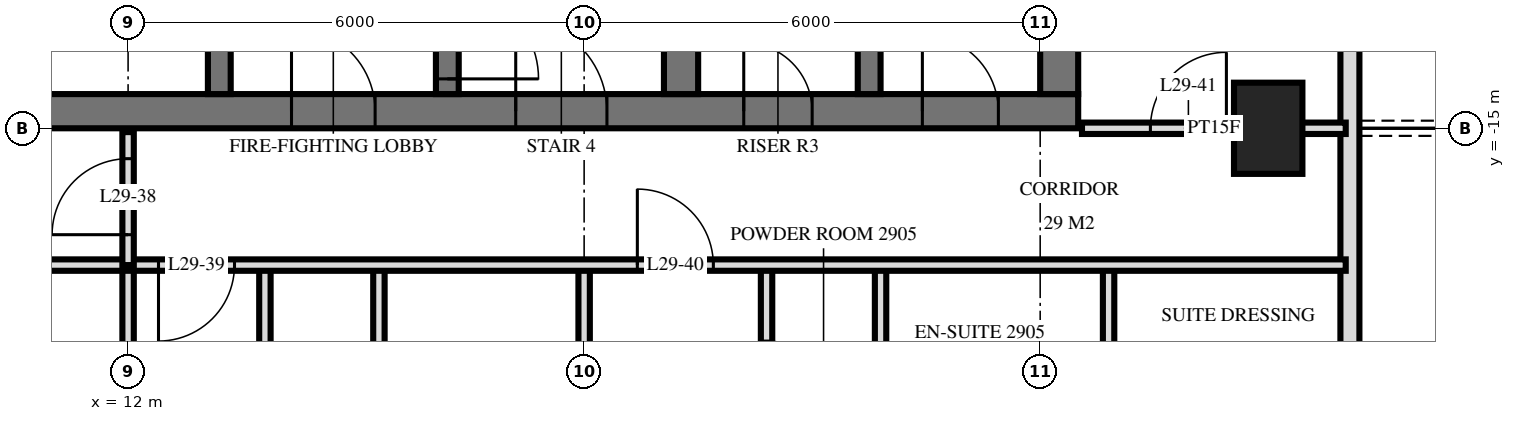
"""IFC4 building model, lengths in metres.
Left out: names, types, materials, properties, quantities, classifications, styles, units other than length and angle.
Written with IfcOpenShell. Run it as: python <this file> out.ifc"""

import sys

from ifc_helpers import new_model, si_unit, direction, frame, frame_2d, origin, origin_2d, place, context, subcontext, project, spatial, rectangle, extrude, element, fill, save


model = new_model("IFC4")
c1 = context("Model", 3, precision=1e-05, world=origin(), true_north=direction((0.0, 1.0)))
c2 = subcontext(c1, "Body", "Model", "MODEL_VIEW")
j1 = project(units=[si_unit("LENGTHUNIT", "METRE"), si_unit("PLANEANGLEUNIT", "RADIAN")], contexts=[c1])
p1 = place(None, origin())
s1 = spatial("IfcSite", under=j1, at=p1, CompositionType="ELEMENT")
p2 = place(p1, origin())
s2 = spatial("IfcBuilding", under=s1, at=p2, CompositionType="ELEMENT")
p3 = place(p2, frame((0.0, 0.0, 116.4)))
s3 = spatial("IfcBuildingStorey", under=s2, at=p3, CompositionType="ELEMENT", Elevation=116.4)
p4 = place(p3, frame((27.0, -15.0, 0.0), z_axis=(0.0, 0.0, 1.0), x_axis=(0.0, 1.0, 0.0)))
e1 = element("IfcColumn", 1, at=p4, inside=s3, PredefinedType="COLUMN", context=c2, shape_type="SweptSolid", body=[
    extrude(rectangle(XDim=1.2, YDim=0.9, at=origin_2d()), origin(), (0.0, 0.0, 1.0), 3.6),
])
p5 = place(p3, frame((10.0, -14.775, 0.0), z_axis=(0.0, 0.0, 1.0), x_axis=(1.0, 0.0, 0.0)))
e2 = element("IfcWall", 2, at=p5, inside=s3, PredefinedType="SHEAR", context=c2, shape_type="SweptSolid", body=[
    extrude(rectangle(XDim=14.5, YDim=0.45, at=frame_2d((7.25, 0.0))), origin(), (0.0, 0.0, 1.0), 3.6),
])
p6 = place(p5, frame((7.1, 0.0, 0.0)))
e3 = element("IfcOpeningElement", 3, at=p6, cuts=e2, PredefinedType="OPENING", context=c2, shape_type="SweptSolid", body=[
    extrude(rectangle(XDim=1.2, YDim=2.1, at=frame_2d((0.6, 1.05))), frame((0.0, 0.235, 0.0), z_axis=(0.0, -1.0, 0.0), x_axis=(1.0, 0.0, 0.0)), (0.0, 0.0, 1.0), 0.47),
])
p7 = place(p5, frame((4.15, 0.0, 0.0)))
e4 = element("IfcOpeningElement", 4, at=p7, cuts=e2, PredefinedType="OPENING", context=c2, shape_type="SweptSolid", body=[
    extrude(rectangle(XDim=1.1, YDim=2.1, at=frame_2d((0.55, 1.05))), frame((0.0, 0.235, 0.0), z_axis=(0.0, -1.0, 0.0), x_axis=(1.0, 0.0, 0.0)), (0.0, 0.0, 1.0), 0.47),
])
p8 = place(p5, frame((10.1, 0.0, 0.0)))
e5 = element("IfcOpeningElement", 5, at=p8, cuts=e2, PredefinedType="OPENING", context=c2, shape_type="SweptSolid", body=[
    extrude(rectangle(XDim=0.9, YDim=2.1, at=frame_2d((0.45, 1.05))), frame((0.0, 0.235, 0.0), z_axis=(0.0, -1.0, 0.0), x_axis=(1.0, 0.0, 0.0)), (0.0, 0.0, 1.0), 0.47),
])
p9 = place(p5, frame((12.45, 0.0, 0.0)))
e6 = element("IfcOpeningElement", 6, at=p9, cuts=e2, PredefinedType="OPENING", context=c2, shape_type="SweptSolid", body=[
    extrude(rectangle(XDim=1.0, YDim=2.1, at=frame_2d((0.5, 1.05))), frame((0.0, 0.235, 0.0), z_axis=(0.0, -1.0, 0.0), x_axis=(1.0, 0.0, 0.0)), (0.0, 0.0, 1.0), 0.47),
])
p10 = place(p3, frame((24.25, -14.55, 0.0), z_axis=(0.0, 0.0, 1.0), x_axis=(0.0, 1.0, 0.0)))
e7 = element("IfcWall", 7, at=p10, inside=s3, PredefinedType="SHEAR", context=c2, shape_type="SweptSolid", body=[
    extrude(rectangle(XDim=14.1, YDim=0.5, at=frame_2d((7.05, 0.0))), origin(), (0.0, 0.0, 1.0), 3.6),
])
p11 = place(p3, frame((13.2, -14.55, 0.0), z_axis=(0.0, 0.0, 1.0), x_axis=(0.0, 1.0, 0.0)))
e8 = element("IfcWall", 8, at=p11, inside=s3, PredefinedType="SHEAR", context=c2, shape_type="SweptSolid", body=[
    extrude(rectangle(XDim=5.4, YDim=0.3, at=frame_2d((2.7, 0.0))), origin(), (0.0, 0.0, 1.0), 3.6),
])
p12 = place(p11, frame((4.0, 0.0, 0.0)))
e9 = element("IfcOpeningElement", 9, at=p12, cuts=e8, PredefinedType="OPENING", context=c2, shape_type="SweptSolid", body=[
    extrude(rectangle(XDim=1.2, YDim=2.1, at=frame_2d((0.6, 1.05))), frame((0.0, 0.16, 0.0), z_axis=(0.0, -1.0, 0.0), x_axis=(1.0, 0.0, 0.0)), (0.0, 0.0, 1.0), 0.32),
])
p13 = place(p3, frame((16.2, -14.55, 0.0), z_axis=(0.0, 0.0, 1.0), x_axis=(0.0, 1.0, 0.0)))
e10 = element("IfcWall", 10, at=p13, inside=s3, PredefinedType="SHEAR", context=c2, shape_type="SweptSolid", body=[
    extrude(rectangle(XDim=5.4, YDim=0.3, at=frame_2d((2.7, 0.0))), origin(), (0.0, 0.0, 1.0), 3.6),
])
p14 = place(p13, frame((0.2, 0.0, 0.0)))
e11 = element("IfcOpeningElement", 11, at=p14, cuts=e10, PredefinedType="OPENING", context=c2, shape_type="SweptSolid", body=[
    extrude(rectangle(XDim=1.2, YDim=2.1, at=frame_2d((0.6, 1.05))), frame((0.0, 0.16, 0.0), z_axis=(0.0, -1.0, 0.0), x_axis=(1.0, 0.0, 0.0)), (0.0, 0.0, 1.0), 0.32),
])
p15 = place(p3, frame((19.275, -14.55, 0.0), z_axis=(0.0, 0.0, 1.0), x_axis=(0.0, 1.0, 0.0)))
e12 = element("IfcWall", 12, at=p15, inside=s3, PredefinedType="SHEAR", context=c2, shape_type="SweptSolid", body=[
    extrude(rectangle(XDim=5.4, YDim=0.45, at=frame_2d((2.7, 0.0))), origin(), (0.0, 0.0, 1.0), 3.6),
])
p16 = place(p3, frame((21.75, -14.55, 0.0), z_axis=(0.0, 0.0, 1.0), x_axis=(0.0, 1.0, 0.0)))
e13 = element("IfcWall", 13, at=p16, inside=s3, PredefinedType="SHEAR", context=c2, shape_type="SweptSolid", body=[
    extrude(rectangle(XDim=5.4, YDim=0.3, at=frame_2d((2.7, 0.0))), origin(), (0.0, 0.0, 1.0), 3.6),
])
p17 = place(p3, frame((28.075, -29.275, 0.0), z_axis=(0.0, 0.0, 1.0), x_axis=(0.0, 1.0, 0.0)))
e14 = element("IfcWall", 14, at=p17, inside=s3, PredefinedType="SOLIDWALL", context=c2, shape_type="SweptSolid", body=[
    extrude(rectangle(XDim=25.951, YDim=0.25, at=frame_2d((12.975, 0.0))), origin(), (0.0, 0.0, 1.0), 3.32),
])
p18 = place(p17, frame((0.575, 0.0, 0.0)))
e15 = element("IfcOpeningElement", 15, at=p18, cuts=e14, PredefinedType="OPENING", context=c2, shape_type="SweptSolid", body=[
    extrude(rectangle(XDim=1.8, YDim=2.4, at=frame_2d((0.9, 1.2))), frame((0.0, 0.135, 0.0), z_axis=(0.0, -1.0, 0.0), x_axis=(1.0, 0.0, 0.0)), (0.0, 0.0, 1.0), 0.27),
])
p19 = place(p17, frame((3.325, 0.0, 0.3)))
e16 = element("IfcOpeningElement", 16, at=p19, cuts=e14, PredefinedType="OPENING", context=c2, shape_type="SweptSolid", body=[
    extrude(rectangle(XDim=1.8, YDim=2.1, at=frame_2d((0.9, 1.05))), frame((0.0, 0.135, 0.0), z_axis=(0.0, -1.0, 0.0), x_axis=(1.0, 0.0, 0.0)), (0.0, 0.0, 1.0), 0.27),
])
p20 = place(p17, frame((6.075, 0.0, 0.0)))
e17 = element("IfcOpeningElement", 17, at=p20, cuts=e14, PredefinedType="OPENING", context=c2, shape_type="SweptSolid", body=[
    extrude(rectangle(XDim=1.8, YDim=2.4, at=frame_2d((0.9, 1.2))), frame((0.0, 0.135, 0.0), z_axis=(0.0, -1.0, 0.0), x_axis=(1.0, 0.0, 0.0)), (0.0, 0.0, 1.0), 0.27),
])
p21 = place(p17, frame((17.125, 0.0, 0.0)))
e18 = element("IfcOpeningElement", 18, at=p21, cuts=e14, PredefinedType="OPENING", context=c2, shape_type="SweptSolid", body=[
    extrude(rectangle(XDim=1.8, YDim=2.4, at=frame_2d((0.9, 1.2))), frame((0.0, 0.135, 0.0), z_axis=(0.0, -1.0, 0.0), x_axis=(1.0, 0.0, 0.0)), (0.0, 0.0, 1.0), 0.27),
])
p22 = place(p3, frame((24.9, -19.8, 0.0), z_axis=(0.0, 0.0, 1.0), x_axis=(0.0, 1.0, 0.0)))
e19 = element("IfcWall", 19, at=p22, inside=s3, PredefinedType="PARTITIONING", context=c2, shape_type="SweptSolid", body=[
    extrude(rectangle(XDim=3.0, YDim=0.15, at=frame_2d((1.5, 0.0))), origin(), (0.0, 0.0, 1.0), 3.32),
])
p23 = place(p3, frame((21.9, -19.8, 0.0), z_axis=(0.0, 0.0, 1.0), x_axis=(0.0, 1.0, 0.0)))
e20 = element("IfcWall", 20, at=p23, inside=s3, PredefinedType="PLUMBINGWALL", context=c2, shape_type="SweptSolid", body=[
    extrude(rectangle(XDim=3.0, YDim=0.15, at=frame_2d((1.5, 0.0))), origin(), (0.0, 0.0, 1.0), 3.32),
])
p24 = place(p3, frame((20.4, -19.8, 0.0), z_axis=(0.0, 0.0, 1.0), x_axis=(0.0, 1.0, 0.0)))
e21 = element("IfcWall", 21, at=p24, inside=s3, PredefinedType="PARTITIONING", context=c2, shape_type="SweptSolid", body=[
    extrude(rectangle(XDim=3.0, YDim=0.15, at=frame_2d((1.5, 0.0))), origin(), (0.0, 0.0, 1.0), 3.32),
])
p25 = place(p24, frame((1.0, 0.0, 0.0)))
e22 = element("IfcOpeningElement", 22, at=p25, cuts=e21, PredefinedType="OPENING", context=c2, shape_type="SweptSolid", body=[
    extrude(rectangle(XDim=1.0, YDim=2.1, at=frame_2d((0.5, 1.05))), frame((0.0, 0.085, 0.0), z_axis=(0.0, -1.0, 0.0), x_axis=(1.0, 0.0, 0.0)), (0.0, 0.0, 1.0), 0.17),
])
p26 = place(p3, frame((18.0, -19.8, 0.0), z_axis=(0.0, 0.0, 1.0), x_axis=(0.0, 1.0, 0.0)))
e23 = element("IfcWall", 23, at=p26, inside=s3, PredefinedType="PARTITIONING", context=c2, shape_type="SweptSolid", body=[
    extrude(rectangle(XDim=3.0, YDim=0.15, at=frame_2d((1.5, 0.0))), origin(), (0.0, 0.0, 1.0), 3.32),
])
p27 = place(p3, frame((15.3, -20.6, 0.0), z_axis=(0.0, 0.0, 1.0), x_axis=(0.0, 1.0, 0.0)))
e24 = element("IfcWall", 24, at=p27, inside=s3, PredefinedType="PARTITIONING", context=c2, shape_type="SweptSolid", body=[
    extrude(rectangle(XDim=3.8, YDim=0.15, at=frame_2d((1.9, 0.0))), origin(), (0.0, 0.0, 1.0), 3.32),
])
p28 = place(p3, frame((13.8, -20.6, 0.0), z_axis=(0.0, 0.0, 1.0), x_axis=(0.0, 1.0, 0.0)))
e25 = element("IfcWall", 25, at=p28, inside=s3, PredefinedType="PARTITIONING", context=c2, shape_type="SweptSolid", body=[
    extrude(rectangle(XDim=3.8, YDim=0.15, at=frame_2d((1.9, 0.0))), origin(), (0.0, 0.0, 1.0), 3.32),
])
p29 = place(p28, frame((1.45, 0.0, 0.0)))
e26 = element("IfcOpeningElement", 26, at=p29, cuts=e25, PredefinedType="OPENING", context=c2, shape_type="SweptSolid", body=[
    extrude(rectangle(XDim=0.9, YDim=2.1, at=frame_2d((0.45, 1.05))), frame((0.0, 0.085, 0.0), z_axis=(0.0, -1.0, 0.0), x_axis=(1.0, 0.0, 0.0)), (0.0, 0.0, 1.0), 0.17),
])
p30 = place(p3, frame((12.0, -16.8, 0.0), z_axis=(0.0, 0.0, 1.0), x_axis=(0.0, 1.0, 0.0)))
e27 = element("IfcWall", 27, at=p30, inside=s3, PredefinedType="PARTITIONING", context=c2, shape_type="SweptSolid", body=[
    extrude(rectangle(XDim=1.75, YDim=0.15, at=frame_2d((0.875, 0.0))), origin(), (0.0, 0.0, 1.0), 3.32),
])
p31 = place(p30, frame((0.4, 0.0, 0.0)))
e28 = element("IfcOpeningElement", 28, at=p31, cuts=e27, PredefinedType="OPENING", context=c2, shape_type="SweptSolid", body=[
    extrude(rectangle(XDim=1.0, YDim=2.1, at=frame_2d((0.5, 1.05))), frame((0.0, 0.085, 0.0), z_axis=(0.0, -1.0, 0.0), x_axis=(1.0, 0.0, 0.0)), (0.0, 0.0, 1.0), 0.17),
])
p32 = place(p3, frame((12.0, -33.62, 0.0), z_axis=(0.0, 0.0, 1.0), x_axis=(0.0, 1.0, 0.0)))
e29 = element("IfcWall", 29, at=p32, inside=s3, PredefinedType="PARTITIONING", context=c2, shape_type="SweptSolid", body=[
    extrude(rectangle(XDim=16.82, YDim=0.15, at=frame_2d((8.41, 0.0))), origin(), (0.0, 0.0, 1.0), 3.32),
])
p33 = place(p3, frame((-28.02, -16.8, 0.0), z_axis=(0.0, 0.0, 1.0), x_axis=(1.0, 0.0, 0.0)))
e30 = element("IfcWall", 30, at=p33, inside=s3, PredefinedType="PARTITIONING", context=c2, shape_type="SweptSolid", body=[
    extrude(rectangle(XDim=56.04, YDim=0.15, at=frame_2d((28.02, 0.0))), origin(), (0.0, 0.0, 1.0), 3.32),
])
p34 = place(p33, frame((13.17, 0.0, 0.0)))
e31 = element("IfcOpeningElement", 31, at=p34, cuts=e30, PredefinedType="OPENING", context=c2, shape_type="SweptSolid", body=[
    extrude(rectangle(XDim=1.0, YDim=2.1, at=frame_2d((0.5, 1.05))), frame((0.0, 0.085, 0.0), z_axis=(0.0, -1.0, 0.0), x_axis=(1.0, 0.0, 0.0)), (0.0, 0.0, 1.0), 0.17),
])
p35 = place(p33, frame((11.87, 0.0, 0.0)))
e32 = element("IfcOpeningElement", 32, at=p35, cuts=e30, PredefinedType="OPENING", context=c2, shape_type="SweptSolid", body=[
    extrude(rectangle(XDim=1.0, YDim=2.1, at=frame_2d((0.5, 1.05))), frame((0.0, 0.085, 0.0), z_axis=(0.0, -1.0, 0.0), x_axis=(1.0, 0.0, 0.0)), (0.0, 0.0, 1.0), 0.17),
])
p36 = place(p33, frame((8.32, 0.0, 0.0)))
e33 = element("IfcOpeningElement", 33, at=p36, cuts=e30, PredefinedType="OPENING", context=c2, shape_type="SweptSolid", body=[
    extrude(rectangle(XDim=1.0, YDim=2.1, at=frame_2d((0.5, 1.05))), frame((0.0, 0.085, 0.0), z_axis=(0.0, -1.0, 0.0), x_axis=(1.0, 0.0, 0.0)), (0.0, 0.0, 1.0), 0.17),
])
p37 = place(p33, frame((40.42, 0.0, 0.0)))
e34 = element("IfcOpeningElement", 34, at=p37, cuts=e30, PredefinedType="OPENING", context=c2, shape_type="SweptSolid", body=[
    extrude(rectangle(XDim=1.0, YDim=2.1, at=frame_2d((0.5, 1.05))), frame((0.0, 0.085, 0.0), z_axis=(0.0, -1.0, 0.0), x_axis=(1.0, 0.0, 0.0)), (0.0, 0.0, 1.0), 0.17),
])
p38 = place(p33, frame((46.72, 0.0, 0.0)))
e35 = element("IfcOpeningElement", 35, at=p38, cuts=e30, PredefinedType="OPENING", context=c2, shape_type="SweptSolid", body=[
    extrude(rectangle(XDim=1.0, YDim=2.1, at=frame_2d((0.5, 1.05))), frame((0.0, 0.085, 0.0), z_axis=(0.0, -1.0, 0.0), x_axis=(1.0, 0.0, 0.0)), (0.0, 0.0, 1.0), 0.17),
])
p39 = place(p33, frame((21.52, 0.0, 0.0)))
e36 = element("IfcOpeningElement", 36, at=p39, cuts=e30, PredefinedType="OPENING", context=c2, shape_type="SweptSolid", body=[
    extrude(rectangle(XDim=1.0, YDim=2.1, at=frame_2d((0.5, 1.05))), frame((0.0, 0.085, 0.0), z_axis=(0.0, -1.0, 0.0), x_axis=(1.0, 0.0, 0.0)), (0.0, 0.0, 1.0), 0.17),
])
p40 = place(p33, frame((30.52, 0.0, 0.0)))
e37 = element("IfcOpeningElement", 37, at=p40, cuts=e30, PredefinedType="OPENING", context=c2, shape_type="SweptSolid", body=[
    extrude(rectangle(XDim=1.0, YDim=2.1, at=frame_2d((0.5, 1.05))), frame((0.0, 0.085, 0.0), z_axis=(0.0, -1.0, 0.0), x_axis=(1.0, 0.0, 0.0)), (0.0, 0.0, 1.0), 0.17),
])
p41 = place(p33, frame((36.52, 0.0, 0.0)))
e38 = element("IfcOpeningElement", 38, at=p41, cuts=e30, PredefinedType="OPENING", context=c2, shape_type="SweptSolid", body=[
    extrude(rectangle(XDim=1.0, YDim=2.1, at=frame_2d((0.5, 1.05))), frame((0.0, 0.085, 0.0), z_axis=(0.0, -1.0, 0.0), x_axis=(1.0, 0.0, 0.0)), (0.0, 0.0, 1.0), 0.17),
])
p42 = place(p3, frame((24.55, -15.0, 0.0), z_axis=(0.0, 0.0, 1.0), x_axis=(1.0, 0.0, 0.0)))
e39 = element("IfcWall", 39, at=p42, inside=s3, PredefinedType="PARTITIONING", context=c2, shape_type="SweptSolid", body=[
    extrude(rectangle(XDim=3.47, YDim=0.15, at=frame_2d((1.735, 0.0))), origin(), (0.0, 0.0, 1.0), 3.32),
])
p43 = place(p42, frame((0.9, 0.0, 0.0)))
e40 = element("IfcOpeningElement", 40, at=p43, cuts=e39, PredefinedType="OPENING", context=c2, shape_type="SweptSolid", body=[
    extrude(rectangle(XDim=1.0, YDim=2.1, at=frame_2d((0.5, 1.05))), frame((0.0, 0.085, 0.0), z_axis=(0.0, -1.0, 0.0), x_axis=(1.0, 0.0, 0.0)), (0.0, 0.0, 1.0), 0.17),
])
p44 = place(p6, origin())
e41 = element("IfcDoor", 41, at=p44, inside=s3, OperationType="SINGLE_SWING_RIGHT", PredefinedType="DOOR", context=c2, shape_type="SweptSolid", body=[
    extrude(rectangle(XDim=1.2, YDim=2.1, at=frame_2d((0.6, 1.05))), frame((0.0, 0.025, 0.0), z_axis=(0.0, -1.0, 0.0), x_axis=(1.0, 0.0, 0.0)), (0.0, 0.0, 1.0), 0.05),
])
fill(e3, e41)
p45 = place(p7, origin())
e42 = element("IfcDoor", 42, at=p45, inside=s3, OperationType="SINGLE_SWING_RIGHT", PredefinedType="DOOR", context=c2, shape_type="SweptSolid", body=[
    extrude(rectangle(XDim=1.1, YDim=2.1, at=frame_2d((0.55, 1.05))), frame((0.0, 0.025, 0.0), z_axis=(0.0, -1.0, 0.0), x_axis=(1.0, 0.0, 0.0)), (0.0, 0.0, 1.0), 0.05),
])
fill(e4, e42)
p46 = place(p8, origin())
e43 = element("IfcDoor", 43, at=p46, inside=s3, OperationType="SINGLE_SWING_RIGHT", PredefinedType="DOOR", context=c2, shape_type="SweptSolid", body=[
    extrude(rectangle(XDim=0.9, YDim=2.1, at=frame_2d((0.45, 1.05))), frame((0.0, 0.025, 0.0), z_axis=(0.0, -1.0, 0.0), x_axis=(1.0, 0.0, 0.0)), (0.0, 0.0, 1.0), 0.05),
])
fill(e5, e43)
p47 = place(p9, origin())
e44 = element("IfcDoor", 44, at=p47, inside=s3, OperationType="SINGLE_SWING_RIGHT", PredefinedType="DOOR", context=c2, shape_type="SweptSolid", body=[
    extrude(rectangle(XDim=1.0, YDim=2.1, at=frame_2d((0.5, 1.05))), frame((0.0, 0.025, 0.0), z_axis=(0.0, -1.0, 0.0), x_axis=(1.0, 0.0, 0.0)), (0.0, 0.0, 1.0), 0.05),
])
fill(e6, e44)
p48 = place(p14, frame((0.6, 0.0, 0.0), z_axis=(0.0, 0.0, 1.0), x_axis=(-1.0, 0.0, 0.0)))
e45 = element("IfcDoor", 45, at=p48, inside=s3, OperationType="SINGLE_SWING_LEFT", PredefinedType="DOOR", context=c2, shape_type="SweptSolid", body=[
    extrude(rectangle(XDim=1.2, YDim=2.1, at=frame_2d((0.0, 1.05))), frame((0.0, -0.025, 0.0), z_axis=(0.0, 1.0, 0.0), x_axis=(-1.0, 0.0, 0.0)), (0.0, 0.0, 1.0), 0.05),
])
fill(e11, e45)
p49 = place(p31, origin())
e46 = element("IfcDoor", 46, at=p49, inside=s3, OperationType="SINGLE_SWING_RIGHT", PredefinedType="DOOR", context=c2, shape_type="SweptSolid", body=[
    extrude(rectangle(XDim=1.0, YDim=2.1, at=frame_2d((0.5, 1.05))), frame((0.0, 0.025, 0.0), z_axis=(0.0, -1.0, 0.0), x_axis=(1.0, 0.0, 0.0)), (0.0, 0.0, 1.0), 0.05),
])
fill(e28, e46)
p50 = place(p37, frame((0.5, 0.0, 0.0), z_axis=(0.0, 0.0, 1.0), x_axis=(-1.0, 0.0, 0.0)))
e47 = element("IfcDoor", 47, at=p50, inside=s3, OperationType="SINGLE_SWING_LEFT", PredefinedType="DOOR", context=c2, shape_type="SweptSolid", body=[
    extrude(rectangle(XDim=1.0, YDim=2.1, at=frame_2d((0.0, 1.05))), frame((0.0, -0.025, 0.0), z_axis=(0.0, 1.0, 0.0), x_axis=(-1.0, 0.0, 0.0)), (0.0, 0.0, 1.0), 0.05),
])
fill(e34, e47)
p51 = place(p38, origin())
e48 = element("IfcDoor", 48, at=p51, inside=s3, OperationType="SINGLE_SWING_RIGHT", PredefinedType="DOOR", context=c2, shape_type="SweptSolid", body=[
    extrude(rectangle(XDim=1.0, YDim=2.1, at=frame_2d((0.5, 1.05))), frame((0.0, 0.025, 0.0), z_axis=(0.0, -1.0, 0.0), x_axis=(1.0, 0.0, 0.0)), (0.0, 0.0, 1.0), 0.05),
])
fill(e35, e48)
p52 = place(p43, origin())
e49 = element("IfcDoor", 49, at=p52, inside=s3, OperationType="SINGLE_SWING_LEFT", PredefinedType="DOOR", context=c2, shape_type="SweptSolid", body=[
    extrude(rectangle(XDim=1.0, YDim=2.1, at=frame_2d((0.5, 1.05))), frame((0.0, 0.025, 0.0), z_axis=(0.0, -1.0, 0.0), x_axis=(1.0, 0.0, 0.0)), (0.0, 0.0, 1.0), 0.05),
])
fill(e40, e49)
save(model, sys.argv[1])
